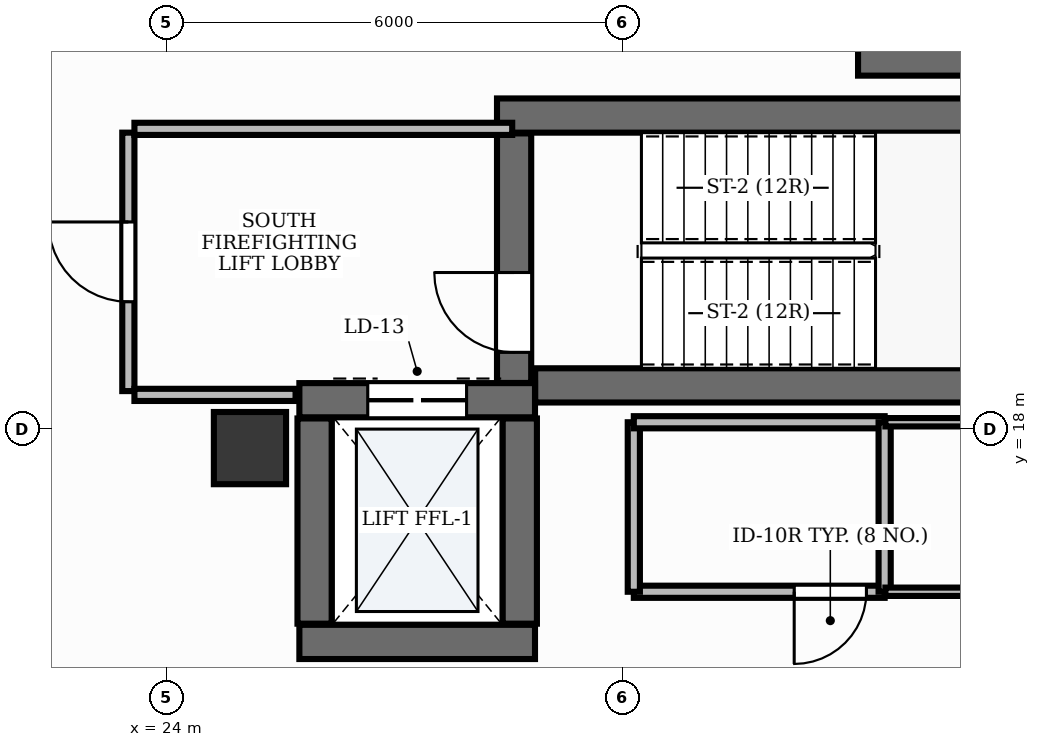
"""IFC4 building model, lengths in metres.
Left out: names, types, materials, properties, quantities, classifications, styles, units other than length and angle.
Written with IfcOpenShell. Run it as: python <this file> out.ifc"""

import sys

from ifc_helpers import new_model, si_unit, direction, frame, frame_2d, origin, origin_2d, place, context, subcontext, project, spatial, rectangle, extrude, element, fill, save


model = new_model("IFC4")
c1 = context("Model", 3, precision=1e-05, world=origin(), true_north=direction((0.0, 1.0)))
c2 = subcontext(c1, "Body", "Model", "MODEL_VIEW")
j1 = project(units=[si_unit("LENGTHUNIT", "METRE"), si_unit("PLANEANGLEUNIT", "RADIAN")], contexts=[c1])
p1 = place(None, origin())
s1 = spatial("IfcSite", under=j1, at=p1, CompositionType="ELEMENT")
p2 = place(p1, origin())
s2 = spatial("IfcBuilding", under=s1, at=p2, CompositionType="ELEMENT")
p3 = place(p2, frame((0.0, 0.0, 76.2)))
s3 = spatial("IfcBuildingStorey", under=s2, at=p3, CompositionType="ELEMENT", Elevation=76.2)
p4 = place(p3, frame((28.852, 18.575, 0.0), z_axis=(0.0, 0.0, 1.0), x_axis=(1.0, 0.0, 0.0)))
e1 = element("IfcWall", 1, at=p4, inside=s3, PredefinedType="SHEAR", context=c2, shape_type="SweptSolid", body=[
    extrude(rectangle(XDim=8.248, YDim=0.45, at=frame_2d((4.124, 0.0))), origin(), (0.0, 0.0, 1.0), 3.9),
])
p5 = place(p3, frame((28.35, 22.125, 0.0), z_axis=(0.0, 0.0, 1.0), x_axis=(1.0, 0.0, 0.0)))
e2 = element("IfcWall", 2, at=p5, inside=s3, PredefinedType="SHEAR", context=c2, shape_type="SweptSolid", body=[
    extrude(rectangle(XDim=8.75, YDim=0.45, at=frame_2d((4.375, 0.0))), origin(), (0.0, 0.0, 1.0), 3.9),
])
p6 = place(p3, frame((28.575, 18.607, 0.0), z_axis=(0.0, 0.0, 1.0), x_axis=(0.0, 1.0, 0.0)))
e3 = element("IfcWall", 3, at=p6, inside=s3, PredefinedType="SHEAR", context=c2, shape_type="SweptSolid", body=[
    extrude(rectangle(XDim=3.283, YDim=0.45, at=frame_2d((1.642, 0.0))), origin(), (0.0, 0.0, 1.0), 3.9),
])
p7 = place(p6, frame((0.403, 0.0, 0.0)))
e4 = element("IfcOpeningElement", 4, at=p7, cuts=e3, PredefinedType="OPENING", context=c2, shape_type="SweptSolid", body=[
    extrude(rectangle(XDim=1.05, YDim=2.15, at=frame_2d((0.525, 1.075))), frame((0.0, 0.24, 0.0), z_axis=(0.0, -1.0, 0.0), x_axis=(1.0, 0.0, 0.0)), (0.0, 0.0, 1.0), 0.48),
])
p8 = place(p3, frame((33.1, 22.875, 0.0), z_axis=(0.0, 0.0, 1.0), x_axis=(1.0, 0.0, 0.0)))
e5 = element("IfcWall", 5, at=p8, inside=s3, PredefinedType="SHEAR", context=c2, shape_type="SweptSolid", body=[
    extrude(rectangle(XDim=4.0, YDim=0.45, at=frame_2d((2.0, 0.0))), origin(), (0.0, 0.0, 1.0), 3.9),
])
p9 = place(p3, frame((25.75, 15.2, 0.0), z_axis=(0.0, 0.0, 1.0), x_axis=(1.0, 0.0, 0.0)))
e6 = element("IfcWall", 6, at=p9, inside=s3, PredefinedType="SHEAR", context=c2, shape_type="SweptSolid", body=[
    extrude(rectangle(XDim=3.1, YDim=0.45, at=frame_2d((1.55, 0.0))), origin(), (0.0, 0.0, 1.0), 3.9),
])
p10 = place(p3, frame((25.75, 18.38, 0.0), z_axis=(0.0, 0.0, 1.0), x_axis=(1.0, 0.0, 0.0)))
e7 = element("IfcWall", 7, at=p10, inside=s3, PredefinedType="SHEAR", context=c2, shape_type="SweptSolid", body=[
    extrude(rectangle(XDim=3.1, YDim=0.45, at=frame_2d((1.55, 0.0))), origin(), (0.0, 0.0, 1.0), 3.9),
])
p11 = place(p10, frame((0.9, 0.0, 0.0)))
e8 = element("IfcOpeningElement", 8, at=p11, cuts=e7, PredefinedType="OPENING", context=c2, shape_type="SweptSolid", body=[
    extrude(rectangle(XDim=1.3, YDim=2.2, at=frame_2d((0.65, 1.1))), frame((0.0, 0.24, 0.0), z_axis=(0.0, -1.0, 0.0), x_axis=(1.0, 0.0, 0.0)), (0.0, 0.0, 1.0), 0.48),
])
for number, where, z_axis, x_axis in (
    (9, (25.95, 15.44, 0.0), (0.0, 0.0, 1.0), (0.0, 1.0, 0.0)),
    (10, (28.65, 15.44, 0.0), (0.0, 0.0, 1.0), (0.0, 1.0, 0.0)),
):
    element("IfcWall", number, at=place(p3, frame(where, z_axis=z_axis, x_axis=x_axis)), inside=s3, PredefinedType="SHEAR", context=c2, shape_type="SweptSolid", body=[
        extrude(rectangle(XDim=2.7, YDim=0.45, at=frame_2d((1.35, 0.0))), origin(), (0.0, 0.0, 1.0), 3.9),
    ])
p12 = place(p3, frame((25.1, 17.75, -0.0), z_axis=(0.0, 0.0, 1.0), x_axis=(1.0, 0.0, 0.0)))
e11 = element("IfcColumn", 11, at=p12, inside=s3, PredefinedType="PILASTER", context=c2, shape_type="SweptSolid", body=[
    extrude(rectangle(XDim=0.95, YDim=0.95, at=origin_2d()), origin(), (0.0, 0.0, 1.0), 3.901),
])
p13 = place(p3, frame((23.5, 18.5, 0.0), z_axis=(0.0, 0.0, 1.0), x_axis=(0.0, 1.0, 0.0)))
e12 = element("IfcWall", 12, at=p13, inside=s3, PredefinedType="PARTITIONING", context=c2, shape_type="SweptSolid", body=[
    extrude(rectangle(XDim=3.4, YDim=0.16, at=frame_2d((1.7, 0.0))), origin(), (0.0, 0.0, 1.0), 2.91),
])
p14 = place(p13, frame((1.175, 0.0, 0.0)))
e13 = element("IfcOpeningElement", 13, at=p14, cuts=e12, PredefinedType="OPENING", context=c2, shape_type="SweptSolid", body=[
    extrude(rectangle(XDim=1.05, YDim=2.15, at=frame_2d((0.525, 1.075))), frame((0.0, 0.095, 0.0), z_axis=(0.0, -1.0, 0.0), x_axis=(1.0, 0.0, 0.0)), (0.0, 0.0, 1.0), 0.19),
])
p15 = place(p3, frame((23.58, 21.95, 0.0), z_axis=(0.0, 0.0, 1.0), x_axis=(1.0, 0.0, 0.0)))
e14 = element("IfcWall", 14, at=p15, inside=s3, PredefinedType="PARTITIONING", context=c2, shape_type="SweptSolid", body=[
    extrude(rectangle(XDim=4.97, YDim=0.16, at=frame_2d((2.485, 0.0))), origin(), (0.0, 0.0, 1.0), 2.91),
])
p16 = place(p3, frame((23.58, 18.45, 0.0), z_axis=(0.0, 0.0, 1.0), x_axis=(1.0, 0.0, 0.0)))
e15 = element("IfcWall", 15, at=p16, inside=s3, PredefinedType="PARTITIONING", context=c2, shape_type="SweptSolid", body=[
    extrude(rectangle(XDim=2.12, YDim=0.16, at=frame_2d((1.06, 0.0))), origin(), (0.0, 0.0, 1.0), 2.91),
])
p17 = place(p3, frame((33.45, 15.86, 0.0), z_axis=(0.0, 0.0, 1.0), x_axis=(-1.0, 0.0, 0.0)))
e16 = element("IfcWall", 16, at=p17, inside=s3, PredefinedType="PARTITIONING", context=c2, shape_type="SweptSolid", body=[
    extrude(rectangle(XDim=3.3, YDim=0.16, at=frame_2d((1.65, 0.0))), origin(), (0.0, 0.0, 1.0), 2.91),
])
p18 = place(p17, frame((0.24, 0.0, 0.0)))
e17 = element("IfcOpeningElement", 17, at=p18, cuts=e16, PredefinedType="OPENING", context=c2, shape_type="SweptSolid", body=[
    extrude(rectangle(XDim=0.95, YDim=2.15, at=frame_2d((0.475, 1.075))), frame((0.0, 0.095, 0.0), z_axis=(0.0, -1.0, 0.0), x_axis=(1.0, 0.0, 0.0)), (0.0, 0.0, 1.0), 0.19),
])
p19 = place(p3, frame((30.15, 15.86, 0.0), z_axis=(0.0, 0.0, 1.0), x_axis=(0.0, 1.0, 0.0)))
e18 = element("IfcWall", 18, at=p19, inside=s3, PredefinedType="PARTITIONING", context=c2, shape_type="SweptSolid", body=[
    extrude(rectangle(XDim=2.23, YDim=0.16, at=frame_2d((1.115, 0.0))), origin(), (0.0, 0.0, 1.0), 2.91),
])
p20 = place(p3, frame((30.15, 18.09, 0.0), z_axis=(0.0, 0.0, 1.0), x_axis=(1.0, 0.0, 0.0)))
e19 = element("IfcWall", 19, at=p20, inside=s3, PredefinedType="PARTITIONING", context=c2, shape_type="SweptSolid", body=[
    extrude(rectangle(XDim=3.3, YDim=0.16, at=frame_2d((1.65, 0.0))), origin(), (0.0, 0.0, 1.0), 2.91),
])
p21 = place(p3, frame((33.45, 18.09, 0.0), z_axis=(0.0, 0.0, 1.0), x_axis=(0.0, -1.0, 0.0)))
e20 = element("IfcWall", 20, at=p21, inside=s3, PredefinedType="PARTITIONING", context=c2, shape_type="SweptSolid", body=[
    extrude(rectangle(XDim=2.23, YDim=0.16, at=frame_2d((1.115, 0.0))), origin(), (0.0, 0.0, 1.0), 2.91),
])
p22 = place(p3, frame((36.4, 15.86, 0.0), z_axis=(0.0, 0.0, 1.0), x_axis=(-1.0, 0.0, 0.0)))
e21 = element("IfcWall", 21, at=p22, inside=s3, PredefinedType="MOVABLE", context=c2, shape_type="SweptSolid", body=[
    extrude(rectangle(XDim=2.94, YDim=0.11, at=frame_2d((1.47, 0.0))), origin(), (0.0, 0.0, 1.0), 2.91),
])
p23 = place(p3, frame((33.46, 18.09, 0.0), z_axis=(0.0, 0.0, 1.0), x_axis=(1.0, 0.0, 0.0)))
e22 = element("IfcWall", 22, at=p23, inside=s3, PredefinedType="MOVABLE", context=c2, shape_type="SweptSolid", body=[
    extrude(rectangle(XDim=3.89, YDim=0.11, at=frame_2d((1.945, 0.0))), origin(), (0.0, 0.0, 1.0), 2.91),
])
p24 = place(p7, origin())
e23 = element("IfcDoor", 23, at=p24, inside=s3, OperationType="SINGLE_SWING_RIGHT", PredefinedType="DOOR", context=c2, shape_type="SweptSolid", body=[
    extrude(rectangle(XDim=1.05, YDim=2.15, at=frame_2d((0.525, 1.075))), frame((0.0, 0.025, 0.0), z_axis=(0.0, -1.0, 0.0), x_axis=(1.0, 0.0, 0.0)), (0.0, 0.0, 1.0), 0.05),
])
fill(e4, e23)
p25 = place(p11, origin())
e24 = element("IfcDoor", 24, at=p25, inside=s3, OperationType="DOUBLE_DOOR_SLIDING", PredefinedType="DOOR", context=c2, shape_type="SweptSolid", body=[
    extrude(rectangle(XDim=1.3, YDim=2.2, at=frame_2d((0.65, 1.1))), frame((0.0, 0.025, 0.0), z_axis=(0.0, -1.0, 0.0), x_axis=(1.0, 0.0, 0.0)), (0.0, 0.0, 1.0), 0.05),
])
fill(e8, e24)
p26 = place(p14, origin())
e25 = element("IfcDoor", 25, at=p26, inside=s3, OperationType="SINGLE_SWING_RIGHT", PredefinedType="DOOR", context=c2, shape_type="SweptSolid", body=[
    extrude(rectangle(XDim=1.05, YDim=2.15, at=frame_2d((0.525, 1.075))), frame((0.0, 0.025, 0.0), z_axis=(0.0, -1.0, 0.0), x_axis=(1.0, 0.0, 0.0)), (0.0, 0.0, 1.0), 0.05),
])
fill(e13, e25)
p27 = place(p18, origin())
e26 = element("IfcDoor", 26, at=p27, inside=s3, OperationType="SINGLE_SWING_RIGHT", PredefinedType="DOOR", context=c2, shape_type="SweptSolid", body=[
    extrude(rectangle(XDim=0.95, YDim=2.15, at=frame_2d((0.475, 1.075))), frame((0.0, 0.025, 0.0), z_axis=(0.0, -1.0, 0.0), x_axis=(1.0, 0.0, 0.0)), (0.0, 0.0, 1.0), 0.05),
])
fill(e17, e26)
save(model, sys.argv[1])
